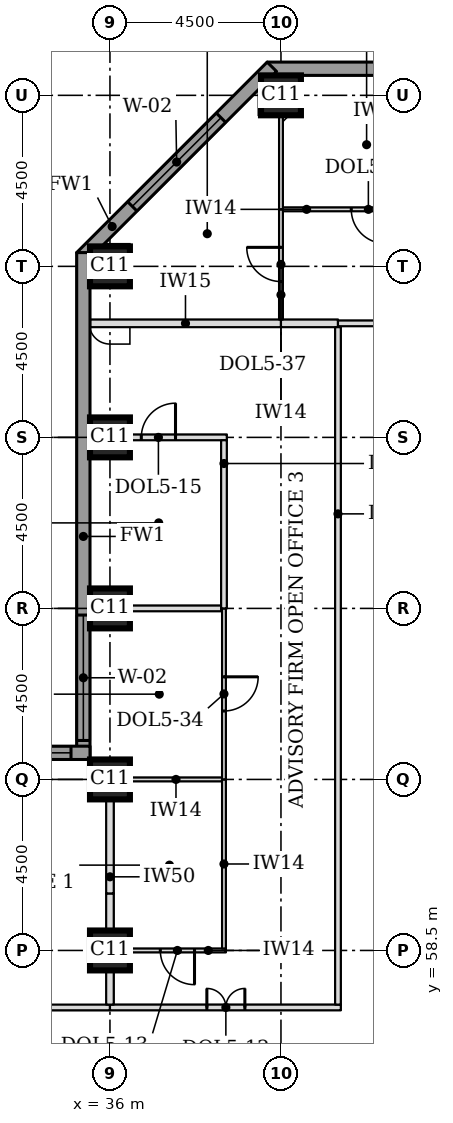
"""IFC4 building model, lengths in metres.
Left out: names, types, materials, properties, quantities, classifications, styles, units other than length and angle.
Written with IfcOpenShell. Run it as: python <this file> out.ifc"""

import sys

from ifc_helpers import new_model, si_unit, direction, frame, frame_2d, origin, origin_2d, place, context, subcontext, project, spatial, rectangle, extrude, element, fill, save


model = new_model("IFC4")
c1 = context("Model", 3, precision=1e-05, world=origin(), true_north=direction((0.0, 1.0)))
c2 = subcontext(c1, "Body", "Model", "MODEL_VIEW")
j1 = project(units=[si_unit("LENGTHUNIT", "METRE"), si_unit("PLANEANGLEUNIT", "RADIAN")], contexts=[c1])
p1 = place(None, origin())
s1 = spatial("IfcSite", under=j1, at=p1, CompositionType="ELEMENT")
p2 = place(p1, origin())
s2 = spatial("IfcBuilding", under=s1, at=p2, CompositionType="ELEMENT")
p3 = place(p2, frame((0.0, 0.0, 112.2)))
s3 = spatial("IfcBuildingStorey", under=s2, at=p3, CompositionType="ELEMENT", Elevation=112.2)
for number, where, z_axis, x_axis in (
    (1, (36.0, 58.5, 0.0), (0.0, 0.0, 1.0), (1.0, 0.0, 0.0)),
    (2, (36.0, 63.0, 0.0), (0.0, 0.0, 1.0), (1.0, 0.0, 0.0)),
    (3, (36.0, 67.5, 0.0), (0.0, 0.0, 1.0), (1.0, 0.0, 0.0)),
    (4, (36.0, 72.0, 0.0), (0.0, 0.0, 1.0), (1.0, 0.0, 0.0)),
    (5, (36.0, 76.5, 0.0), (0.0, 0.0, 1.0), (1.0, 0.0, 0.0)),
    (6, (40.5, 81.0, 0.0), (0.0, 0.0, 1.0), (1.0, 0.0, 0.0)),
):
    element("IfcColumn", number, at=place(p3, frame(where, z_axis=z_axis, x_axis=x_axis)), inside=s3, PredefinedType="COLUMN", context=c2, shape_type="SweptSolid", body=[
        extrude(rectangle(XDim=1.05, YDim=1.05, at=origin_2d()), origin(), (0.0, 0.0, 1.0), 3.7),
    ])
p4 = place(p3, frame((72.362, 81.7, 0.0), z_axis=(0.0, 0.0, 1.0), x_axis=(-1.0, 0.0, 0.0)))
e7 = element("IfcWall", 7, at=p4, inside=s3, PredefinedType="STANDARD", context=c2, shape_type="SweptSolid", body=[
    extrude(rectangle(XDim=32.225, YDim=0.35, at=frame_2d((16.112, 0.0))), origin(), (0.0, 0.0, 1.0), 3.525),
])
p5 = place(p4, frame((5.462, 0.0, 0.9)))
e8 = element("IfcOpeningElement", 8, at=p5, cuts=e7, PredefinedType="OPENING", context=c2, shape_type="SweptSolid", body=[
    extrude(rectangle(XDim=3.3, YDim=1.9, at=frame_2d((1.65, 0.95))), frame((0.0, 0.185, 0.0), z_axis=(0.0, -1.0, 0.0), x_axis=(1.0, 0.0, 0.0)), (0.0, 0.0, 1.0), 0.37),
])
p6 = place(p4, frame((9.962, 0.0, 0.9)))
e9 = element("IfcOpeningElement", 9, at=p6, cuts=e7, PredefinedType="OPENING", context=c2, shape_type="SweptSolid", body=[
    extrude(rectangle(XDim=3.3, YDim=1.9, at=frame_2d((1.65, 0.95))), frame((0.0, 0.185, 0.0), z_axis=(0.0, -1.0, 0.0), x_axis=(1.0, 0.0, 0.0)), (0.0, 0.0, 1.0), 0.37),
])
p7 = place(p4, frame((14.462, 0.0, 0.9)))
e10 = element("IfcOpeningElement", 10, at=p7, cuts=e7, PredefinedType="OPENING", context=c2, shape_type="SweptSolid", body=[
    extrude(rectangle(XDim=3.3, YDim=1.9, at=frame_2d((1.65, 0.95))), frame((0.0, 0.185, 0.0), z_axis=(0.0, -1.0, 0.0), x_axis=(1.0, 0.0, 0.0)), (0.0, 0.0, 1.0), 0.37),
])
p8 = place(p4, frame((18.962, 0.0, 0.9)))
e11 = element("IfcOpeningElement", 11, at=p8, cuts=e7, PredefinedType="OPENING", context=c2, shape_type="SweptSolid", body=[
    extrude(rectangle(XDim=3.3, YDim=1.9, at=frame_2d((1.65, 0.95))), frame((0.0, 0.185, 0.0), z_axis=(0.0, -1.0, 0.0), x_axis=(1.0, 0.0, 0.0)), (0.0, 0.0, 1.0), 0.37),
])
p9 = place(p4, frame((23.462, 0.0, 0.9)))
e12 = element("IfcOpeningElement", 12, at=p9, cuts=e7, PredefinedType="OPENING", context=c2, shape_type="SweptSolid", body=[
    extrude(rectangle(XDim=3.3, YDim=1.9, at=frame_2d((1.65, 0.95))), frame((0.0, 0.185, 0.0), z_axis=(0.0, -1.0, 0.0), x_axis=(1.0, 0.0, 0.0)), (0.0, 0.0, 1.0), 0.37),
])
p10 = place(p3, frame((40.261, 81.751, 0.0), z_axis=(0.0, 0.0, 1.0), x_axis=(-0.707106781187, -0.707106781187, 0.0)))
e13 = element("IfcWall", 13, at=p10, inside=s3, PredefinedType="STANDARD", context=c2, shape_type="SweptSolid", body=[
    extrude(rectangle(XDim=7.089, YDim=0.35, at=frame_2d((3.544, 0.0))), origin(), (0.0, 0.0, 1.0), 3.525),
])
p11 = place(p10, frame((1.894, 0.0, 0.9)))
e14 = element("IfcOpeningElement", 14, at=p11, cuts=e13, PredefinedType="OPENING", context=c2, shape_type="SweptSolid", body=[
    extrude(rectangle(XDim=3.3, YDim=1.9, at=frame_2d((1.65, 0.95))), frame((0.0, 0.185, 0.0), z_axis=(0.0, -1.0, 0.0), x_axis=(1.0, 0.0, 0.0)), (0.0, 0.0, 1.0), 0.37),
])
p12 = place(p3, frame((35.3, 76.862, 0.0), z_axis=(0.0, 0.0, 1.0), x_axis=(0.0, -1.0, 0.0)))
e15 = element("IfcWall", 15, at=p12, inside=s3, PredefinedType="STANDARD", context=c2, shape_type="SweptSolid", body=[
    extrude(rectangle(XDim=13.337, YDim=0.35, at=frame_2d((6.669, 0.0))), origin(), (0.0, 0.0, 1.0), 3.525),
])
p13 = place(p12, frame((9.537, 0.0, 0.9)))
e16 = element("IfcOpeningElement", 16, at=p13, cuts=e15, PredefinedType="OPENING", context=c2, shape_type="SweptSolid", body=[
    extrude(rectangle(XDim=3.3, YDim=1.9, at=frame_2d((1.65, 0.95))), frame((0.0, 0.185, 0.0), z_axis=(0.0, -1.0, 0.0), x_axis=(1.0, 0.0, 0.0)), (0.0, 0.0, 1.0), 0.37),
])
p14 = place(p3, frame((35.475, 63.7, 0.0), z_axis=(0.0, 0.0, 1.0), x_axis=(-1.0, 0.0, 0.0)))
e17 = element("IfcWall", 17, at=p14, inside=s3, PredefinedType="STANDARD", context=c2, shape_type="SweptSolid", body=[
    extrude(rectangle(XDim=17.837, YDim=0.35, at=frame_2d((8.919, 0.0))), origin(), (0.0, 0.0, 1.0), 3.525),
])
p15 = place(p14, frame((0.5, 0.0, 0.9)))
e18 = element("IfcOpeningElement", 18, at=p15, cuts=e17, PredefinedType="OPENING", context=c2, shape_type="SweptSolid", body=[
    extrude(rectangle(XDim=3.3, YDim=1.9, at=frame_2d((1.65, 0.95))), frame((0.0, 0.185, 0.0), z_axis=(0.0, -1.0, 0.0), x_axis=(1.0, 0.0, 0.0)), (0.0, 0.0, 1.0), 0.37),
])
p16 = place(p14, frame((9.075, 0.0, 0.9)))
e19 = element("IfcOpeningElement", 19, at=p16, cuts=e17, PredefinedType="OPENING", context=c2, shape_type="SweptSolid", body=[
    extrude(rectangle(XDim=3.3, YDim=1.9, at=frame_2d((1.65, 0.95))), frame((0.0, 0.185, 0.0), z_axis=(0.0, -1.0, 0.0), x_axis=(1.0, 0.0, 0.0)), (0.0, 0.0, 1.0), 0.37),
])
p17 = place(p3, frame((29.38, 57.0, 0.0), z_axis=(0.0, 0.0, 1.0), x_axis=(1.0, 0.0, 0.0)))
e20 = element("IfcWall", 20, at=p17, inside=s3, PredefinedType="PARTITIONING", context=c2, shape_type="SweptSolid", body=[
    extrude(rectangle(XDim=6.62, YDim=0.15, at=frame_2d((3.31, 0.0))), origin(), (0.0, 0.0, 1.0), 3.55),
])
p18 = place(p17, frame((2.88, 0.0, 0.0)))
e21 = element("IfcOpeningElement", 21, at=p18, cuts=e20, PredefinedType="OPENING", context=c2, shape_type="SweptSolid", body=[
    extrude(rectangle(XDim=1.0, YDim=2.1, at=frame_2d((0.5, 1.05))), frame((0.0, 0.085, 0.0), z_axis=(0.0, -1.0, 0.0), x_axis=(1.0, 0.0, 0.0)), (0.0, 0.0, 1.0), 0.17),
])
p19 = place(p3, frame((36.0, 57.0, 0.0), z_axis=(0.0, 0.0, 1.0), x_axis=(1.0, 0.0, 0.0)))
e22 = element("IfcWall", 22, at=p19, inside=s3, PredefinedType="PARTITIONING", context=c2, shape_type="SweptSolid", body=[
    extrude(rectangle(XDim=6.075, YDim=0.15, at=frame_2d((3.038, 0.0))), origin(), (0.0, 0.0, 1.0), 3.55),
])
p20 = place(p19, frame((2.55, 0.0, 0.0)))
e23 = element("IfcOpeningElement", 23, at=p20, cuts=e22, PredefinedType="OPENING", context=c2, shape_type="SweptSolid", body=[
    extrude(rectangle(XDim=1.0, YDim=2.1, at=frame_2d((0.5, 1.05))), frame((0.0, 0.085, 0.0), z_axis=(0.0, -1.0, 0.0), x_axis=(1.0, 0.0, 0.0)), (0.0, 0.0, 1.0), 0.17),
])
p21 = place(p3, frame((36.525, 58.5, 0.0), z_axis=(0.0, 0.0, 1.0), x_axis=(1.0, 0.0, 0.0)))
e24 = element("IfcWall", 24, at=p21, inside=s3, PredefinedType="PARTITIONING", context=c2, shape_type="SweptSolid", body=[
    extrude(rectangle(XDim=2.525, YDim=0.1, at=frame_2d((1.263, 0.0))), origin(), (0.0, 0.0, 1.0), 3.55),
])
p22 = place(p21, frame((0.8, 0.0, 0.0)))
e25 = element("IfcOpeningElement", 25, at=p22, cuts=e24, PredefinedType="OPENING", context=c2, shape_type="SweptSolid", body=[
    extrude(rectangle(XDim=0.9, YDim=2.1, at=frame_2d((0.45, 1.05))), frame((0.0, 0.06, 0.0), z_axis=(0.0, -1.0, 0.0), x_axis=(1.0, 0.0, 0.0)), (0.0, 0.0, 1.0), 0.12),
])
p23 = place(p3, frame((36.525, 63.0, 0.0), z_axis=(0.0, 0.0, 1.0), x_axis=(1.0, 0.0, 0.0)))
e26 = element("IfcWall", 26, at=p23, inside=s3, PredefinedType="PARTITIONING", context=c2, shape_type="SweptSolid", body=[
    extrude(rectangle(XDim=2.425, YDim=0.1, at=frame_2d((1.212, 0.0))), origin(), (0.0, 0.0, 1.0), 3.55),
])
p24 = place(p3, frame((35.475, 67.5, 0.0), z_axis=(0.0, 0.0, 1.0), x_axis=(1.0, 0.0, 0.0)))
e27 = element("IfcWall", 27, at=p24, inside=s3, PredefinedType="PARTITIONING", context=c2, shape_type="SweptSolid", body=[
    extrude(rectangle(XDim=3.45, YDim=0.15, at=frame_2d((1.725, 0.0))), origin(), (0.0, 0.0, 1.0), 3.55),
])
p25 = place(p3, frame((35.475, 72.0, 0.0), z_axis=(0.0, 0.0, 1.0), x_axis=(1.0, 0.0, 0.0)))
e28 = element("IfcWall", 28, at=p25, inside=s3, PredefinedType="PARTITIONING", context=c2, shape_type="SweptSolid", body=[
    extrude(rectangle(XDim=3.6, YDim=0.15, at=frame_2d((1.8, 0.0))), origin(), (0.0, 0.0, 1.0), 3.55),
])
p26 = place(p25, frame((1.35, 0.0, 0.0)))
e29 = element("IfcOpeningElement", 29, at=p26, cuts=e28, PredefinedType="OPENING", context=c2, shape_type="SweptSolid", body=[
    extrude(rectangle(XDim=0.9, YDim=2.1, at=frame_2d((0.45, 1.05))), frame((0.0, 0.085, 0.0), z_axis=(0.0, -1.0, 0.0), x_axis=(1.0, 0.0, 0.0)), (0.0, 0.0, 1.0), 0.17),
])
p27 = place(p3, frame((35.475, 75.0, 0.0), z_axis=(0.0, 0.0, 1.0), x_axis=(1.0, 0.0, 0.0)))
e30 = element("IfcWall", 30, at=p27, inside=s3, PredefinedType="PARTITIONING", context=c2, shape_type="SweptSolid", body=[
    extrude(rectangle(XDim=5.025, YDim=0.2, at=frame_2d((2.512, 0.0))), origin(), (0.0, 0.0, 1.0), 3.55),
])
p28 = place(p3, frame((40.5, 75.0, 0.0), z_axis=(0.0, 0.0, 1.0), x_axis=(1.0, 0.0, 0.0)))
e31 = element("IfcWall", 31, at=p28, inside=s3, PredefinedType="PARTITIONING", context=c2, shape_type="SweptSolid", body=[
    extrude(rectangle(XDim=1.5, YDim=0.2, at=frame_2d((0.75, 0.0))), origin(), (0.0, 0.0, 1.0), 3.55),
])
p29 = place(p3, frame((42.0, 75.0, 0.0), z_axis=(0.0, 0.0, 1.0), x_axis=(1.0, 0.0, 0.0)))
e32 = element("IfcWall", 32, at=p29, inside=s3, PredefinedType="PARTITIONING", context=c2, shape_type="SweptSolid", body=[
    extrude(rectangle(XDim=4.5, YDim=0.15, at=frame_2d((2.25, 0.0))), origin(), (0.0, 0.0, 1.0), 3.55),
])
p30 = place(p29, frame((1.75, 0.0, 0.0)))
e33 = element("IfcOpeningElement", 33, at=p30, cuts=e32, PredefinedType="OPENING", context=c2, shape_type="SweptSolid", body=[
    extrude(rectangle(XDim=1.0, YDim=2.1, at=frame_2d((0.5, 1.05))), frame((0.0, 0.085, 0.0), z_axis=(0.0, -1.0, 0.0), x_axis=(1.0, 0.0, 0.0)), (0.0, 0.0, 1.0), 0.17),
])
p31 = place(p3, frame((40.55, 78.0, 0.0), z_axis=(0.0, 0.0, 1.0), x_axis=(1.0, 0.0, 0.0)))
e34 = element("IfcWall", 34, at=p31, inside=s3, PredefinedType="PARTITIONING", context=c2, shape_type="SweptSolid", body=[
    extrude(rectangle(XDim=4.45, YDim=0.1, at=frame_2d((2.225, 0.0))), origin(), (0.0, 0.0, 1.0), 3.55),
])
p32 = place(p31, frame((1.8, 0.0, 0.0)))
e35 = element("IfcOpeningElement", 35, at=p32, cuts=e34, PredefinedType="OPENING", context=c2, shape_type="SweptSolid", body=[
    extrude(rectangle(XDim=0.9, YDim=2.1, at=frame_2d((0.45, 1.05))), frame((0.0, 0.06, 0.0), z_axis=(0.0, -1.0, 0.0), x_axis=(1.0, 0.0, 0.0)), (0.0, 0.0, 1.0), 0.12),
])
p33 = place(p3, frame((36.0, 57.075, 0.0), z_axis=(0.0, 0.0, 1.0), x_axis=(0.0, 1.0, 0.0)))
e36 = element("IfcWall", 36, at=p33, inside=s3, PredefinedType="PARTITIONING", context=c2, shape_type="SweptSolid", body=[
    extrude(rectangle(XDim=0.9, YDim=0.2, at=frame_2d((0.45, 0.0))), origin(), (0.0, 0.0, 1.0), 2.8),
])
p34 = place(p3, frame((42.0, 57.075, 0.0), z_axis=(0.0, 0.0, 1.0), x_axis=(0.0, 1.0, 0.0)))
e37 = element("IfcWall", 37, at=p34, inside=s3, PredefinedType="PARTITIONING", context=c2, shape_type="SweptSolid", body=[
    extrude(rectangle(XDim=17.825, YDim=0.15, at=frame_2d((8.913, 0.0))), origin(), (0.0, 0.0, 1.0), 3.55),
])
p35 = place(p3, frame((39.0, 58.55, 0.0), z_axis=(0.0, 0.0, 1.0), x_axis=(0.0, 1.0, 0.0)))
e38 = element("IfcWall", 38, at=p35, inside=s3, PredefinedType="PARTITIONING", context=c2, shape_type="SweptSolid", body=[
    extrude(rectangle(XDim=4.45, YDim=0.1, at=frame_2d((2.225, 0.0))), origin(), (0.0, 0.0, 1.0), 3.55),
])
p36 = place(p3, frame((36.0, 58.995, 0.0), z_axis=(0.0, 0.0, 1.0), x_axis=(0.0, 1.0, 0.0)))
e39 = element("IfcWall", 39, at=p36, inside=s3, PredefinedType="PARTITIONING", context=c2, shape_type="SweptSolid", body=[
    extrude(rectangle(XDim=1.005, YDim=0.2, at=frame_2d((0.502, 0.0))), origin(), (0.0, 0.0, 1.0), 2.8),
])
p37 = place(p3, frame((36.0, 60.0, 0.0), z_axis=(0.0, 0.0, 1.0), x_axis=(0.0, 1.0, 0.0)))
e40 = element("IfcWall", 40, at=p37, inside=s3, PredefinedType="PARTITIONING", context=c2, shape_type="SweptSolid", body=[
    extrude(rectangle(XDim=2.475, YDim=0.2, at=frame_2d((1.238, 0.0))), origin(), (0.0, 0.0, 1.0), 2.8),
])
p38 = place(p3, frame((39.0, 63.0, 0.0), z_axis=(0.0, 0.0, 1.0), x_axis=(0.0, 1.0, 0.0)))
e41 = element("IfcWall", 41, at=p38, inside=s3, PredefinedType="PARTITIONING", context=c2, shape_type="SweptSolid", body=[
    extrude(rectangle(XDim=4.5, YDim=0.1, at=frame_2d((2.25, 0.0))), origin(), (0.0, 0.0, 1.0), 3.55),
])
p39 = place(p38, frame((1.8, 0.0, 0.0)))
e42 = element("IfcOpeningElement", 42, at=p39, cuts=e41, PredefinedType="OPENING", context=c2, shape_type="SweptSolid", body=[
    extrude(rectangle(XDim=0.9, YDim=2.1, at=frame_2d((0.45, 1.05))), frame((0.0, 0.06, 0.0), z_axis=(0.0, -1.0, 0.0), x_axis=(1.0, 0.0, 0.0)), (0.0, 0.0, 1.0), 0.12),
])
p40 = place(p3, frame((39.0, 67.5, 0.0), z_axis=(0.0, 0.0, 1.0), x_axis=(0.0, 1.0, 0.0)))
e43 = element("IfcWall", 43, at=p40, inside=s3, PredefinedType="PARTITIONING", context=c2, shape_type="SweptSolid", body=[
    extrude(rectangle(XDim=4.425, YDim=0.15, at=frame_2d((2.212, 0.0))), origin(), (0.0, 0.0, 1.0), 3.55),
])
p41 = place(p3, frame((40.5, 75.1, 0.0), z_axis=(0.0, 0.0, 1.0), x_axis=(0.0, 1.0, 0.0)))
e44 = element("IfcWall", 44, at=p41, inside=s3, PredefinedType="PARTITIONING", context=c2, shape_type="SweptSolid", body=[
    extrude(rectangle(XDim=2.9, YDim=0.1, at=frame_2d((1.45, 0.0))), origin(), (0.0, 0.0, 1.0), 3.55),
])
p42 = place(p41, frame((1.0, 0.0, 0.0)))
e45 = element("IfcOpeningElement", 45, at=p42, cuts=e44, PredefinedType="OPENING", context=c2, shape_type="SweptSolid", body=[
    extrude(rectangle(XDim=0.9, YDim=2.1, at=frame_2d((0.45, 1.05))), frame((0.0, 0.06, 0.0), z_axis=(0.0, -1.0, 0.0), x_axis=(1.0, 0.0, 0.0)), (0.0, 0.0, 1.0), 0.12),
])
p43 = place(p3, frame((40.5, 78.0, 0.0), z_axis=(0.0, 0.0, 1.0), x_axis=(0.0, 1.0, 0.0)))
e46 = element("IfcWall", 46, at=p43, inside=s3, PredefinedType="PARTITIONING", context=c2, shape_type="SweptSolid", body=[
    extrude(rectangle(XDim=2.475, YDim=0.1, at=frame_2d((1.238, 0.0))), origin(), (0.0, 0.0, 1.0), 3.55),
])
p44 = place(p11, origin())
e47 = element("IfcWindow", 47, at=p44, inside=s3, PartitioningType="SINGLE_PANEL", PredefinedType="WINDOW", context=c2, shape_type="SweptSolid", body=[
    extrude(rectangle(XDim=3.3, YDim=1.9, at=frame_2d((1.65, 0.95))), frame((0.0, 0.085, 0.0), z_axis=(0.0, -1.0, 0.0), x_axis=(1.0, 0.0, 0.0)), (0.0, 0.0, 1.0), 0.06),
])
fill(e14, e47)
p45 = place(p13, origin())
e48 = element("IfcWindow", 48, at=p45, inside=s3, PartitioningType="SINGLE_PANEL", PredefinedType="WINDOW", context=c2, shape_type="SweptSolid", body=[
    extrude(rectangle(XDim=3.3, YDim=1.9, at=frame_2d((1.65, 0.95))), frame((0.0, 0.085, 0.0), z_axis=(0.0, -1.0, 0.0), x_axis=(1.0, 0.0, 0.0)), (0.0, 0.0, 1.0), 0.06),
])
fill(e16, e48)
p46 = place(p15, origin())
e49 = element("IfcWindow", 49, at=p46, inside=s3, PartitioningType="SINGLE_PANEL", PredefinedType="WINDOW", context=c2, shape_type="SweptSolid", body=[
    extrude(rectangle(XDim=3.3, YDim=1.9, at=frame_2d((1.65, 0.95))), frame((0.0, 0.085, 0.0), z_axis=(0.0, -1.0, 0.0), x_axis=(1.0, 0.0, 0.0)), (0.0, 0.0, 1.0), 0.06),
])
fill(e18, e49)
p47 = place(p42, origin())
e50 = element("IfcDoor", 50, at=p47, inside=s3, OperationType="SINGLE_SWING_RIGHT", PredefinedType="DOOR", context=c2, shape_type="SweptSolid", body=[
    extrude(rectangle(XDim=0.9, YDim=2.1, at=frame_2d((0.45, 1.05))), frame((0.0, 0.025, 0.0), z_axis=(0.0, -1.0, 0.0), x_axis=(1.0, 0.0, 0.0)), (0.0, 0.0, 1.0), 0.05),
])
fill(e45, e50)
p48 = place(p32, frame((0.9, 0.0, 0.0), z_axis=(0.0, 0.0, 1.0), x_axis=(-1.0, 0.0, 0.0)))
e51 = element("IfcDoor", 51, at=p48, inside=s3, OperationType="SINGLE_SWING_LEFT", PredefinedType="DOOR", context=c2, shape_type="SweptSolid", body=[
    extrude(rectangle(XDim=0.9, YDim=2.1, at=frame_2d((0.45, 1.05))), frame((0.0, 0.025, 0.0), z_axis=(0.0, -1.0, 0.0), x_axis=(1.0, 0.0, 0.0)), (0.0, 0.0, 1.0), 0.05),
])
fill(e35, e51)
p49 = place(p20, origin())
e52 = element("IfcDoor", 52, at=p49, inside=s3, OperationType="DOUBLE_DOOR_SINGLE_SWING", PredefinedType="DOOR", context=c2, shape_type="SweptSolid", body=[
    extrude(rectangle(XDim=1.0, YDim=2.1, at=frame_2d((0.5, 1.05))), frame((0.0, 0.025, 0.0), z_axis=(0.0, -1.0, 0.0), x_axis=(1.0, 0.0, 0.0)), (0.0, 0.0, 1.0), 0.05),
])
fill(e23, e52)
p50 = place(p22, frame((0.9, 0.0, 0.0), z_axis=(0.0, 0.0, 1.0), x_axis=(-1.0, 0.0, 0.0)))
e53 = element("IfcDoor", 53, at=p50, inside=s3, OperationType="SINGLE_SWING_LEFT", PredefinedType="DOOR", context=c2, shape_type="SweptSolid", body=[
    extrude(rectangle(XDim=0.9, YDim=2.1, at=frame_2d((0.45, 1.05))), frame((0.0, 0.025, 0.0), z_axis=(0.0, -1.0, 0.0), x_axis=(1.0, 0.0, 0.0)), (0.0, 0.0, 1.0), 0.05),
])
fill(e25, e53)
p51 = place(p39, frame((0.9, 0.0, 0.0), z_axis=(0.0, 0.0, 1.0), x_axis=(-1.0, 0.0, 0.0)))
e54 = element("IfcDoor", 54, at=p51, inside=s3, OperationType="SINGLE_SWING_LEFT", PredefinedType="DOOR", context=c2, shape_type="SweptSolid", body=[
    extrude(rectangle(XDim=0.9, YDim=2.1, at=frame_2d((0.45, 1.05))), frame((0.0, 0.025, 0.0), z_axis=(0.0, -1.0, 0.0), x_axis=(1.0, 0.0, 0.0)), (0.0, 0.0, 1.0), 0.05),
])
fill(e42, e54)
p52 = place(p26, origin())
e55 = element("IfcDoor", 55, at=p52, inside=s3, OperationType="SINGLE_SWING_RIGHT", PredefinedType="DOOR", context=c2, shape_type="SweptSolid", body=[
    extrude(rectangle(XDim=0.9, YDim=2.1, at=frame_2d((0.45, 1.05))), frame((0.0, 0.025, 0.0), z_axis=(0.0, -1.0, 0.0), x_axis=(1.0, 0.0, 0.0)), (0.0, 0.0, 1.0), 0.05),
])
fill(e29, e55)
save(model, sys.argv[1])
